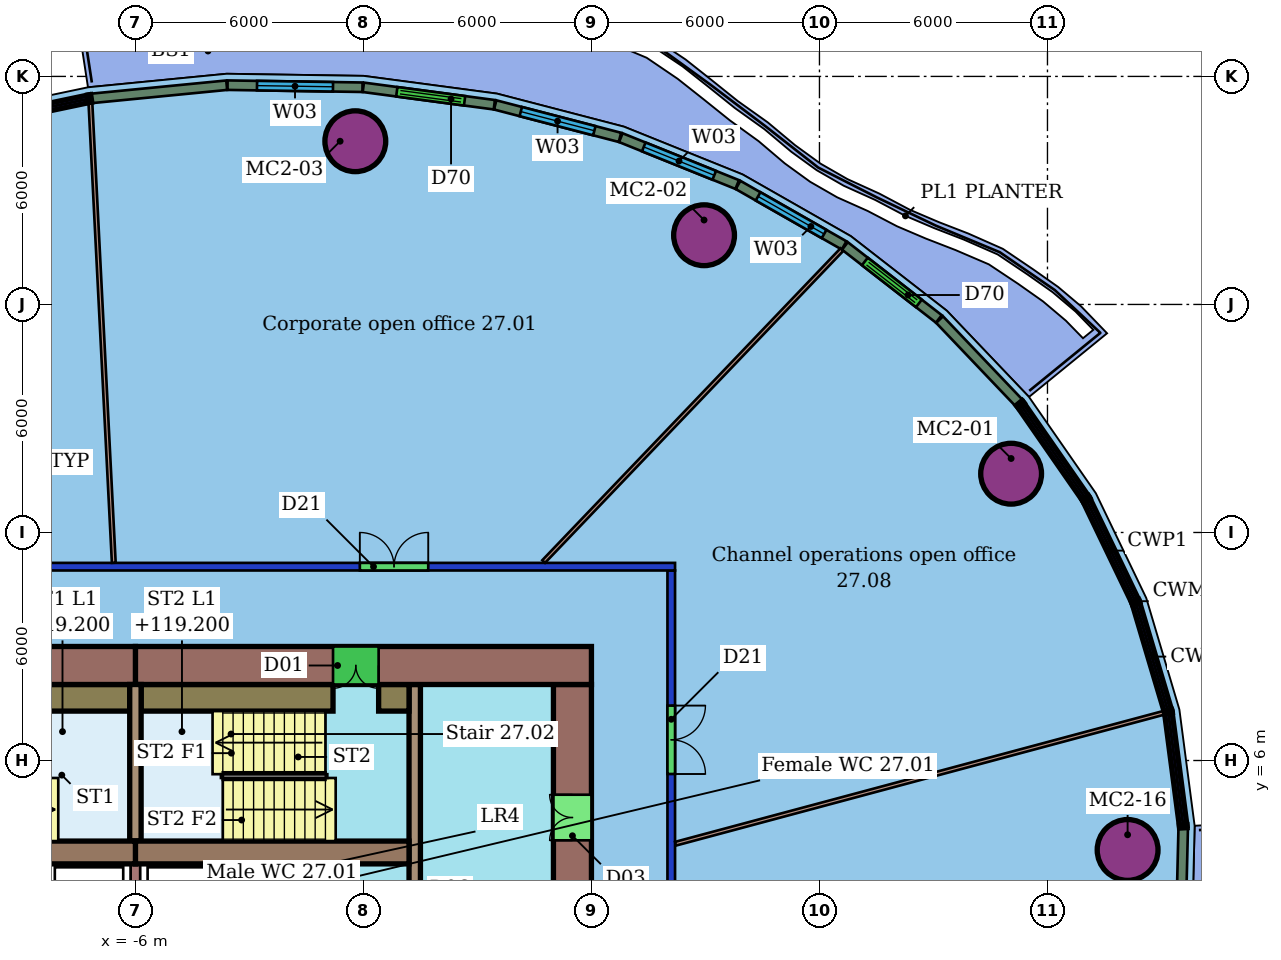
"""IFC4 building model, lengths in metres.
Left out: names, types, materials, properties, quantities, classifications, styles, units other than length and angle.
Written with IfcOpenShell. Run it as: python <this file> out.ifc"""

import sys

from ifc_helpers import new_model, si_unit, direction, frame, frame_2d, origin, origin_2d, place, context, subcontext, project, spatial, rectangle, hollow_circle, extrude, element, fill, save


model = new_model("IFC4")
c1 = context("Model", 3, precision=1e-05, world=origin(), true_north=direction((0.0, 1.0)))
c2 = subcontext(c1, "Body", "Model", "MODEL_VIEW")
j1 = project(units=[si_unit("LENGTHUNIT", "METRE"), si_unit("PLANEANGLEUNIT", "RADIAN")], contexts=[c1])
p1 = place(None, origin())
s1 = spatial("IfcSite", under=j1, at=p1, CompositionType="ELEMENT")
p2 = place(p1, origin())
s2 = spatial("IfcBuilding", under=s1, at=p2, CompositionType="ELEMENT")
p3 = place(p2, frame((0.0, 0.0, 117.4)))
s3 = spatial("IfcBuildingStorey", under=s2, at=p3, CompositionType="ELEMENT", Elevation=117.4)
for number, where, z_axis, x_axis in (
    (1, (17.043, 13.547, 0.0), (0.0, 0.0, 1.0), (1.0, 0.0, 0.0)),
    (2, (8.963, 19.821, 0.0), (0.0, 0.0, 1.0), (1.0, 0.0, 0.0)),
    (3, (-0.213, 22.294, 0.0), (0.0, 0.0, 1.0), (1.0, 0.0, 0.0)),
    (4, (20.109, 3.646, 0.0), (0.0, 0.0, 1.0), (1.0, 0.0, 0.0)),
):
    element("IfcColumn", number, at=place(p3, frame(where, z_axis=z_axis, x_axis=x_axis)), inside=s3, PredefinedType="COLUMN", context=c2, shape_type="SweptSolid", body=[
        extrude(hollow_circle(Radius=0.8, WallThickness=0.055, at=origin_2d()), origin(), (0.0, 0.0, 1.0), 3.45),
    ])
p4 = place(p3, frame((-20.2, 11.1, 0.0), z_axis=(0.0, 0.0, 1.0), x_axis=(1.0, 0.0, 0.0)))
e5 = element("IfcWall", 5, at=p4, inside=s3, PredefinedType="PARTITIONING", context=c2, shape_type="SweptSolid", body=[
    extrude(rectangle(XDim=28.4, YDim=0.2, at=frame_2d((14.2, 0.0))), origin(), (0.0, 0.0, 1.0), 3.0),
])
p5 = place(p4, frame((20.105, 0.0, 0.0)))
e6 = element("IfcOpeningElement", 6, at=p5, cuts=e5, PredefinedType="OPENING", context=c2, shape_type="SweptSolid", body=[
    extrude(rectangle(XDim=1.8, YDim=2.1, at=frame_2d((0.9, 1.05))), frame((0.0, 0.11, 0.0), z_axis=(0.0, -1.0, 0.0), x_axis=(1.0, 0.0, 0.0)), (0.0, 0.0, 1.0), 0.22),
])
p6 = place(p4, frame((7.47, 0.0, 0.0)))
e7 = element("IfcOpeningElement", 7, at=p6, cuts=e5, PredefinedType="OPENING", context=c2, shape_type="SweptSolid", body=[
    extrude(rectangle(XDim=1.0, YDim=2.1, at=frame_2d((0.5, 1.05))), frame((0.0, 0.11, 0.0), z_axis=(0.0, -1.0, 0.0), x_axis=(1.0, 0.0, 0.0)), (0.0, 0.0, 1.0), 0.22),
])
p7 = place(p4, frame((2.651, 0.0, 0.0)))
e8 = element("IfcOpeningElement", 8, at=p7, cuts=e5, PredefinedType="OPENING", context=c2, shape_type="SweptSolid", body=[
    extrude(rectangle(XDim=1.0, YDim=2.4, at=frame_2d((0.5, 1.2))), frame((0.0, 0.11, 0.0), z_axis=(0.0, -1.0, 0.0), x_axis=(1.0, 0.0, 0.0)), (0.0, 0.0, 1.0), 0.22),
])
p8 = place(p3, frame((8.1, 11.0, 0.0), z_axis=(0.0, 0.0, 1.0), x_axis=(0.0, -1.0, 0.0)))
e9 = element("IfcWall", 9, at=p8, inside=s3, PredefinedType="PARTITIONING", context=c2, shape_type="SweptSolid", body=[
    extrude(rectangle(XDim=22.0, YDim=0.2, at=frame_2d((11.0, 0.0))), origin(), (0.0, 0.0, 1.0), 3.0),
])
p9 = place(p8, frame((10.779, 0.0, 0.0)))
e10 = element("IfcOpeningElement", 10, at=p9, cuts=e9, PredefinedType="OPENING", context=c2, shape_type="SweptSolid", body=[
    extrude(rectangle(XDim=1.8, YDim=2.1, at=frame_2d((0.9, 1.05))), frame((0.0, 0.11, 0.0), z_axis=(0.0, -1.0, 0.0), x_axis=(1.0, 0.0, 0.0)), (0.0, 0.0, 1.0), 0.22),
])
p10 = place(p8, frame((3.555, 0.0, 0.0)))
e11 = element("IfcOpeningElement", 11, at=p10, cuts=e9, PredefinedType="OPENING", context=c2, shape_type="SweptSolid", body=[
    extrude(rectangle(XDim=1.8, YDim=2.1, at=frame_2d((0.9, 1.05))), frame((0.0, 0.11, 0.0), z_axis=(0.0, -1.0, 0.0), x_axis=(1.0, 0.0, 0.0)), (0.0, 0.0, 1.0), 0.22),
])
p11 = place(p3, frame((12.59, 19.443, 0.0), z_axis=(0.0, 0.0, 1.0), x_axis=(-0.691074739184, -0.722783304222, 0.0)))
e12 = element("IfcWall", 12, at=p11, inside=s3, PredefinedType="PARTITIONING", context=c2, shape_type="SweptSolid", body=[
    extrude(rectangle(XDim=11.357, YDim=0.1, at=frame_2d((5.678, 0.0))), origin(), (0.0, 0.0, 1.0), 3.45),
])
p12 = place(p3, frame((-7.184, 23.293, 0.0), z_axis=(0.0, 0.0, 1.0), x_axis=(0.050758329283, -0.998710965199, 0.0)))
e13 = element("IfcWall", 13, at=p12, inside=s3, PredefinedType="PARTITIONING", context=c2, shape_type="SweptSolid", body=[
    extrude(rectangle(XDim=12.106, YDim=0.1, at=frame_2d((6.053, 0.0))), origin(), (0.0, 0.0, 1.0), 3.45),
])
p13 = place(p3, frame((21.055, 7.253, 0.0), z_axis=(0.0, 0.0, 1.0), x_axis=(-0.965888777638, -0.258957272989, 0.0)))
e14 = element("IfcWall", 14, at=p13, inside=s3, PredefinedType="PARTITIONING", context=c2, shape_type="SweptSolid", body=[
    extrude(rectangle(XDim=13.296, YDim=0.1, at=frame_2d((6.648, 0.0))), origin(), (0.0, 0.0, 1.0), 3.45),
])
p14 = place(p3, frame((17.244, 15.416, 0.0), z_axis=(0.0, 0.0, 1.0), x_axis=(-0.689879279413, 0.723924429645, 0.0)))
e15 = element("IfcWall", 15, at=p14, inside=s3, PredefinedType="SOLIDWALL", context=c2, shape_type="SweptSolid", body=[
    extrude(rectangle(XDim=3.019, YDim=0.25, at=frame_2d((1.51, 0.0))), origin(), (0.0, 0.0, 1.0), 3.05),
])
p15 = place(p3, frame((15.141, 17.619, 0.0), z_axis=(0.0, 0.0, 1.0), x_axis=(-0.789746930571, 0.613432788213, 0.0)))
e16 = element("IfcWall", 16, at=p15, inside=s3, PredefinedType="SOLIDWALL", context=c2, shape_type="SweptSolid", body=[
    extrude(rectangle(XDim=3.129, YDim=0.25, at=frame_2d((1.565, 0.0))), origin(), (0.0, 0.0, 1.0), 3.05),
])
p16 = place(p15, frame((0.665, 0.0, 0.0)))
e17 = element("IfcOpeningElement", 17, at=p16, cuts=e16, PredefinedType="OPENING", context=c2, shape_type="SweptSolid", body=[
    extrude(rectangle(XDim=1.8, YDim=2.4, at=frame_2d((0.9, 1.2))), frame((0.0, 0.135, 0.0), z_axis=(0.0, -1.0, 0.0), x_axis=(1.0, 0.0, 0.0)), (0.0, 0.0, 1.0), 0.27),
])
p17 = place(p3, frame((12.648, 19.553, 0.0), z_axis=(0.0, 0.0, 1.0), x_axis=(-0.868747839234, 0.495254673705, 0.0)))
e18 = element("IfcWall", 18, at=p17, inside=s3, PredefinedType="SOLIDWALL", context=c2, shape_type="SweptSolid", body=[
    extrude(rectangle(XDim=3.212, YDim=0.25, at=frame_2d((1.606, 0.0))), origin(), (0.0, 0.0, 1.0), 3.05),
])
p18 = place(p17, frame((0.606, 0.0, 0.9)))
e19 = element("IfcOpeningElement", 19, at=p18, cuts=e18, PredefinedType="OPENING", context=c2, shape_type="SweptSolid", body=[
    extrude(rectangle(XDim=2.0, YDim=2.1, at=frame_2d((1.0, 1.05))), frame((0.0, 0.135, 0.0), z_axis=(0.0, -1.0, 0.0), x_axis=(1.0, 0.0, 0.0)), (0.0, 0.0, 1.0), 0.27),
])
p19 = place(p3, frame((9.835, 21.155, 0.0), z_axis=(0.0, 0.0, 1.0), x_axis=(-0.927581627116, 0.373620562919, 0.0)))
e20 = element("IfcWall", 20, at=p19, inside=s3, PredefinedType="SOLIDWALL", context=c2, shape_type="SweptSolid", body=[
    extrude(rectangle(XDim=3.302, YDim=0.25, at=frame_2d((1.651, 0.0))), origin(), (0.0, 0.0, 1.0), 3.05),
])
p20 = place(p19, frame((0.651, 0.0, 0.9)))
e21 = element("IfcOpeningElement", 21, at=p20, cuts=e20, PredefinedType="OPENING", context=c2, shape_type="SweptSolid", body=[
    extrude(rectangle(XDim=2.0, YDim=2.1, at=frame_2d((1.0, 1.05))), frame((0.0, 0.135, 0.0), z_axis=(0.0, -1.0, 0.0), x_axis=(1.0, 0.0, 0.0)), (0.0, 0.0, 1.0), 0.27),
])
p21 = place(p3, frame((6.75, 22.396, 0.0), z_axis=(0.0, 0.0, 1.0), x_axis=(-0.967791300319, 0.251753846101, 0.0)))
e22 = element("IfcWall", 22, at=p21, inside=s3, PredefinedType="SOLIDWALL", context=c2, shape_type="SweptSolid", body=[
    extrude(rectangle(XDim=3.392, YDim=0.25, at=frame_2d((1.696, 0.0))), origin(), (0.0, 0.0, 1.0), 3.05),
])
p22 = place(p21, frame((0.696, 0.0, 0.9)))
e23 = element("IfcOpeningElement", 23, at=p22, cuts=e22, PredefinedType="OPENING", context=c2, shape_type="SweptSolid", body=[
    extrude(rectangle(XDim=2.0, YDim=2.1, at=frame_2d((1.0, 1.05))), frame((0.0, 0.135, 0.0), z_axis=(0.0, -1.0, 0.0), x_axis=(1.0, 0.0, 0.0)), (0.0, 0.0, 1.0), 0.27),
])
p23 = place(p3, frame((3.444, 23.255, 0.0), z_axis=(0.0, 0.0, 1.0), x_axis=(-0.991259146592, 0.131929163936, 0.0)))
e24 = element("IfcWall", 24, at=p23, inside=s3, PredefinedType="SOLIDWALL", context=c2, shape_type="SweptSolid", body=[
    extrude(rectangle(XDim=3.477, YDim=0.25, at=frame_2d((1.739, 0.0))), origin(), (0.0, 0.0, 1.0), 3.05),
])
p24 = place(p23, frame((0.789, 0.0, 0.0)))
e25 = element("IfcOpeningElement", 25, at=p24, cuts=e24, PredefinedType="OPENING", context=c2, shape_type="SweptSolid", body=[
    extrude(rectangle(XDim=1.8, YDim=2.4, at=frame_2d((0.9, 1.2))), frame((0.0, 0.135, 0.0), z_axis=(0.0, -1.0, 0.0), x_axis=(1.0, 0.0, 0.0)), (0.0, 0.0, 1.0), 0.27),
])
p25 = place(p3, frame((-0.025, 23.715, 0.0), z_axis=(0.0, 0.0, 1.0), x_axis=(-0.999881433679, 0.015398655287, 0.0)))
e26 = element("IfcWall", 26, at=p25, inside=s3, PredefinedType="SOLIDWALL", context=c2, shape_type="SweptSolid", body=[
    extrude(rectangle(XDim=3.552, YDim=0.25, at=frame_2d((1.776, 0.0))), origin(), (0.0, 0.0, 1.0), 3.05),
])
p26 = place(p25, frame((0.776, 0.0, 0.9)))
e27 = element("IfcOpeningElement", 27, at=p26, cuts=e26, PredefinedType="OPENING", context=c2, shape_type="SweptSolid", body=[
    extrude(rectangle(XDim=2.0, YDim=2.1, at=frame_2d((1.0, 1.05))), frame((0.0, 0.135, 0.0), z_axis=(0.0, -1.0, 0.0), x_axis=(1.0, 0.0, 0.0)), (0.0, 0.0, 1.0), 0.27),
])
p27 = place(p3, frame((-3.598, 23.769, 0.0), z_axis=(0.0, 0.0, 1.0), x_axis=(-0.995271567876, -0.097131386163, 0.0)))
e28 = element("IfcWall", 28, at=p27, inside=s3, PredefinedType="SOLIDWALL", context=c2, shape_type="SweptSolid", body=[
    extrude(rectangle(XDim=3.567, YDim=0.25, at=frame_2d((1.783, 0.0))), origin(), (0.0, 0.0, 1.0), 3.05),
])
p28 = place(p3, frame((21.499, 1.194, 0.0), z_axis=(0.0, 0.0, 1.0), x_axis=(0.024099130641, 0.999709573777, 0.0)))
e29 = element("IfcWall", 29, at=p28, inside=s3, PredefinedType="SOLIDWALL", context=c2, shape_type="SweptSolid", body=[
    extrude(rectangle(XDim=3.019, YDim=0.25, at=frame_2d((1.51, 0.0))), origin(), (0.0, 0.0, 1.0), 3.05),
])
p29 = place(p3, frame((6.0, 8.5, 0.0), z_axis=(0.0, 0.0, 1.0), x_axis=(-1.0, 0.0, 0.0)))
e30 = element("IfcWall", 30, at=p29, inside=s3, PredefinedType="SHEAR", context=c2, shape_type="SweptSolid", body=[
    extrude(rectangle(XDim=12.0, YDim=1.0, at=frame_2d((6.0, 0.0))), origin(), (0.0, 0.0, 1.0), 3.3),
])
p30 = place(p29, frame((5.6, 0.0, 0.0)))
e31 = element("IfcOpeningElement", 31, at=p30, cuts=e30, PredefinedType="OPENING", context=c2, shape_type="SweptSolid", body=[
    extrude(rectangle(XDim=1.2, YDim=2.1, at=frame_2d((0.6, 1.05))), frame((0.0, 0.51, 0.0), z_axis=(0.0, -1.0, 0.0), x_axis=(1.0, 0.0, 0.0)), (0.0, 0.0, 1.0), 1.02),
])
p31 = place(p3, frame((-6.0, 8.5, 0.0), z_axis=(0.0, 0.0, 1.0), x_axis=(-1.0, 0.0, 0.0)))
e32 = element("IfcWall", 32, at=p31, inside=s3, PredefinedType="SHEAR", context=c2, shape_type="SweptSolid", body=[
    extrude(rectangle(XDim=12.0, YDim=1.0, at=frame_2d((6.0, 0.0))), origin(), (0.0, 0.0, 1.0), 3.3),
])
p32 = place(p31, frame((5.2, 0.0, 0.0)))
e33 = element("IfcOpeningElement", 33, at=p32, cuts=e32, PredefinedType="OPENING", context=c2, shape_type="SweptSolid", body=[
    extrude(rectangle(XDim=1.2, YDim=2.1, at=frame_2d((0.6, 1.05))), frame((0.0, 0.51, 0.0), z_axis=(0.0, -1.0, 0.0), x_axis=(1.0, 0.0, 0.0)), (0.0, 0.0, 1.0), 1.02),
])
p33 = place(p3, frame((5.5, -8.0, 0.0), z_axis=(0.0, 0.0, 1.0), x_axis=(0.0, 1.0, 0.0)))
e34 = element("IfcWall", 34, at=p33, inside=s3, PredefinedType="SHEAR", context=c2, shape_type="SweptSolid", body=[
    extrude(rectangle(XDim=16.0, YDim=1.0, at=frame_2d((8.0, 0.0))), origin(), (0.0, 0.0, 1.0), 3.3),
])
p34 = place(p33, frame((2.9, 0.0, 0.0)))
e35 = element("IfcOpeningElement", 35, at=p34, cuts=e34, PredefinedType="OPENING", context=c2, shape_type="SweptSolid", body=[
    extrude(rectangle(XDim=1.2, YDim=2.1, at=frame_2d((0.6, 1.05))), frame((0.0, 0.51, 0.0), z_axis=(0.0, -1.0, 0.0), x_axis=(1.0, 0.0, 0.0)), (0.0, 0.0, 1.0), 1.02),
])
p35 = place(p33, frame((11.9, 0.0, 0.0)))
e36 = element("IfcOpeningElement", 36, at=p35, cuts=e34, PredefinedType="OPENING", context=c2, shape_type="SweptSolid", body=[
    extrude(rectangle(XDim=1.2, YDim=2.1, at=frame_2d((0.6, 1.05))), frame((0.0, 0.51, 0.0), z_axis=(0.0, -1.0, 0.0), x_axis=(1.0, 0.0, 0.0)), (0.0, 0.0, 1.0), 1.02),
])
for number, where, z_axis, x_axis in (
    (37, (-13.2, 3.58, 0.0), (0.0, 0.0, 1.0), (1.0, 0.0, 0.0)),
    (38, (-6.0, 3.58, 0.0), (0.0, 0.0, 1.0), (1.0, 0.0, 0.0)),
):
    element("IfcWall", number, at=place(p3, frame(where, z_axis=z_axis, x_axis=x_axis)), inside=s3, PredefinedType="SHEAR", context=c2, shape_type="SweptSolid", body=[
        extrude(rectangle(XDim=7.2, YDim=0.6, at=frame_2d((3.6, 0.0))), origin(), (0.0, 0.0, 1.0), 3.3),
    ])
p36 = place(p3, frame((1.35, -8.0, 0.0), z_axis=(0.0, 0.0, 1.0), x_axis=(0.0, 1.0, 0.0)))
e39 = element("IfcWall", 39, at=p36, inside=s3, PredefinedType="SHEAR", context=c2, shape_type="SweptSolid", body=[
    extrude(rectangle(XDim=16.0, YDim=0.3, at=frame_2d((8.0, 0.0))), origin(), (0.0, 0.0, 1.0), 3.3),
])
p37 = place(p36, frame((1.91, 0.0, 0.0)))
e40 = element("IfcOpeningElement", 40, at=p37, cuts=e39, PredefinedType="OPENING", context=c2, shape_type="SweptSolid", body=[
    extrude(rectangle(XDim=1.0, YDim=2.1, at=frame_2d((0.5, 1.05))), frame((0.0, 0.16, 0.0), z_axis=(0.0, -1.0, 0.0), x_axis=(1.0, 0.0, 0.0)), (0.0, 0.0, 1.0), 0.32),
])
p38 = place(p36, frame((7.25, 0.0, 0.0)))
e41 = element("IfcOpeningElement", 41, at=p38, cuts=e39, PredefinedType="OPENING", context=c2, shape_type="SweptSolid", body=[
    extrude(rectangle(XDim=1.5, YDim=2.1, at=frame_2d((0.75, 1.05))), frame((0.0, 0.16, 0.0), z_axis=(0.0, -1.0, 0.0), x_axis=(1.0, 0.0, 0.0)), (0.0, 0.0, 1.0), 0.32),
])
p39 = place(p3, frame((-6.0, 3.88, 0.0), z_axis=(0.0, 0.0, 1.0), x_axis=(0.0, 1.0, 0.0)))
e42 = element("IfcWall", 42, at=p39, inside=s3, PredefinedType="SHEAR", context=c2, shape_type="SweptSolid", body=[
    extrude(rectangle(XDim=4.12, YDim=0.3, at=frame_2d((2.06, 0.0))), origin(), (0.0, 0.0, 1.0), 3.3),
])
for number, where, z_axis, x_axis in (
    (43, (-11.2, 7.65, 0.0), (0.0, 0.0, 1.0), (1.0, 0.0, 0.0)),
    (44, (-5.85, 7.65, 0.0), (0.0, 0.0, 1.0), (1.0, 0.0, 0.0)),
):
    element("IfcWall", number, at=place(p3, frame(where, z_axis=z_axis, x_axis=x_axis)), inside=s3, PredefinedType="SHEAR", context=c2, shape_type="SweptSolid", body=[
        extrude(rectangle(XDim=5.05, YDim=0.7, at=frame_2d((2.525, 0.0))), origin(), (0.0, 0.0, 1.0), 3.3),
    ])
p40 = place(p3, frame((0.4, 7.65, 0.0), z_axis=(0.0, 0.0, 1.0), x_axis=(1.0, 0.0, 0.0)))
e45 = element("IfcWall", 45, at=p40, inside=s3, PredefinedType="SHEAR", context=c2, shape_type="SweptSolid", body=[
    extrude(rectangle(XDim=0.8, YDim=0.7, at=frame_2d((0.4, 0.0))), origin(), (0.0, 0.0, 1.0), 3.3),
])
for number, where, z_axis, x_axis in (
    (46, (-6.0, 1.6, 0.0), (0.0, 0.0, 1.0), (0.0, 1.0, 0.0)),
    (47, (-3.558, 1.6, 0.0), (0.0, 0.0, 1.0), (0.0, 1.0, 0.0)),
):
    element("IfcWall", number, at=place(p3, frame(where, z_axis=z_axis, x_axis=x_axis)), inside=s3, PredefinedType="SHEAR", context=c2, shape_type="SweptSolid", body=[
        extrude(rectangle(XDim=1.68, YDim=0.25, at=frame_2d((0.84, 0.0))), origin(), (0.0, 0.0, 1.0), 3.3),
    ])
p41 = place(p3, frame((-1.117, 1.6, 0.0), z_axis=(0.0, 0.0, 1.0), x_axis=(0.0, 1.0, 0.0)))
e48 = element("IfcWall", 48, at=p41, inside=s3, PredefinedType="PARTITIONING", context=c2, shape_type="SweptSolid", body=[
    extrude(rectangle(XDim=1.68, YDim=0.15, at=frame_2d((0.84, 0.0))), origin(), (0.0, 0.0, 1.0), 3.3),
])
p42 = place(p5, origin())
e49 = element("IfcDoor", 49, at=p42, inside=s3, OperationType="DOUBLE_DOOR_SINGLE_SWING", PredefinedType="DOOR", context=c2, shape_type="SweptSolid", body=[
    extrude(rectangle(XDim=1.8, YDim=2.1, at=frame_2d((0.9, 1.05))), frame((0.0, 0.025, 0.0), z_axis=(0.0, -1.0, 0.0), x_axis=(1.0, 0.0, 0.0)), (0.0, 0.0, 1.0), 0.05),
])
fill(e6, e49)
p43 = place(p10, origin())
e50 = element("IfcDoor", 50, at=p43, inside=s3, OperationType="DOUBLE_DOOR_SINGLE_SWING", PredefinedType="DOOR", context=c2, shape_type="SweptSolid", body=[
    extrude(rectangle(XDim=1.8, YDim=2.1, at=frame_2d((0.9, 1.05))), frame((0.0, 0.025, 0.0), z_axis=(0.0, -1.0, 0.0), x_axis=(1.0, 0.0, 0.0)), (0.0, 0.0, 1.0), 0.05),
])
fill(e11, e50)
p44 = place(p16, origin())
e51 = element("IfcDoor", 51, at=p44, inside=s3, OperationType="DOUBLE_DOOR_SLIDING", PredefinedType="DOOR", context=c2, shape_type="SweptSolid", body=[
    extrude(rectangle(XDim=1.8, YDim=2.4, at=frame_2d((0.9, 1.2))), frame((0.0, 0.025, 0.0), z_axis=(0.0, -1.0, 0.0), x_axis=(1.0, 0.0, 0.0)), (0.0, 0.0, 1.0), 0.05),
])
fill(e17, e51)
p45 = place(p18, origin())
e52 = element("IfcWindow", 52, at=p45, inside=s3, PartitioningType="SINGLE_PANEL", PredefinedType="WINDOW", context=c2, shape_type="SweptSolid", body=[
    extrude(rectangle(XDim=2.0, YDim=2.1, at=frame_2d((1.0, 1.05))), frame((0.0, 0.03, 0.0), z_axis=(0.0, -1.0, 0.0), x_axis=(1.0, 0.0, 0.0)), (0.0, 0.0, 1.0), 0.06),
])
fill(e19, e52)
p46 = place(p20, origin())
e53 = element("IfcWindow", 53, at=p46, inside=s3, PartitioningType="SINGLE_PANEL", PredefinedType="WINDOW", context=c2, shape_type="SweptSolid", body=[
    extrude(rectangle(XDim=2.0, YDim=2.1, at=frame_2d((1.0, 1.05))), frame((0.0, 0.03, 0.0), z_axis=(0.0, -1.0, 0.0), x_axis=(1.0, 0.0, 0.0)), (0.0, 0.0, 1.0), 0.06),
])
fill(e21, e53)
p47 = place(p22, origin())
e54 = element("IfcWindow", 54, at=p47, inside=s3, PartitioningType="SINGLE_PANEL", PredefinedType="WINDOW", context=c2, shape_type="SweptSolid", body=[
    extrude(rectangle(XDim=2.0, YDim=2.1, at=frame_2d((1.0, 1.05))), frame((0.0, 0.03, 0.0), z_axis=(0.0, -1.0, 0.0), x_axis=(1.0, 0.0, 0.0)), (0.0, 0.0, 1.0), 0.06),
])
fill(e23, e54)
p48 = place(p24, origin())
e55 = element("IfcDoor", 55, at=p48, inside=s3, OperationType="DOUBLE_DOOR_SLIDING", PredefinedType="DOOR", context=c2, shape_type="SweptSolid", body=[
    extrude(rectangle(XDim=1.8, YDim=2.4, at=frame_2d((0.9, 1.2))), frame((0.0, 0.025, 0.0), z_axis=(0.0, -1.0, 0.0), x_axis=(1.0, 0.0, 0.0)), (0.0, 0.0, 1.0), 0.05),
])
fill(e25, e55)
p49 = place(p26, origin())
e56 = element("IfcWindow", 56, at=p49, inside=s3, PartitioningType="SINGLE_PANEL", PredefinedType="WINDOW", context=c2, shape_type="SweptSolid", body=[
    extrude(rectangle(XDim=2.0, YDim=2.1, at=frame_2d((1.0, 1.05))), frame((0.0, 0.03, 0.0), z_axis=(0.0, -1.0, 0.0), x_axis=(1.0, 0.0, 0.0)), (0.0, 0.0, 1.0), 0.06),
])
fill(e27, e56)
p50 = place(p30, origin())
e57 = element("IfcDoor", 57, at=p50, inside=s3, OperationType="DOUBLE_DOOR_SINGLE_SWING", PredefinedType="NOTDEFINED", context=c2, shape_type="SweptSolid", body=[
    extrude(rectangle(XDim=1.2, YDim=2.1, at=frame_2d((0.6, 1.05))), frame((0.0, 0.025, 0.0), z_axis=(0.0, -1.0, 0.0), x_axis=(1.0, 0.0, 0.0)), (0.0, 0.0, 1.0), 0.05),
])
fill(e31, e57)
p51 = place(p35, origin())
e58 = element("IfcDoor", 58, at=p51, inside=s3, OperationType="DOUBLE_DOOR_SINGLE_SWING", PredefinedType="NOTDEFINED", context=c2, shape_type="SweptSolid", body=[
    extrude(rectangle(XDim=1.2, YDim=2.1, at=frame_2d((0.6, 1.05))), frame((0.0, 0.025, 0.0), z_axis=(0.0, -1.0, 0.0), x_axis=(1.0, 0.0, 0.0)), (0.0, 0.0, 1.0), 0.05),
])
fill(e36, e58)
save(model, sys.argv[1])
